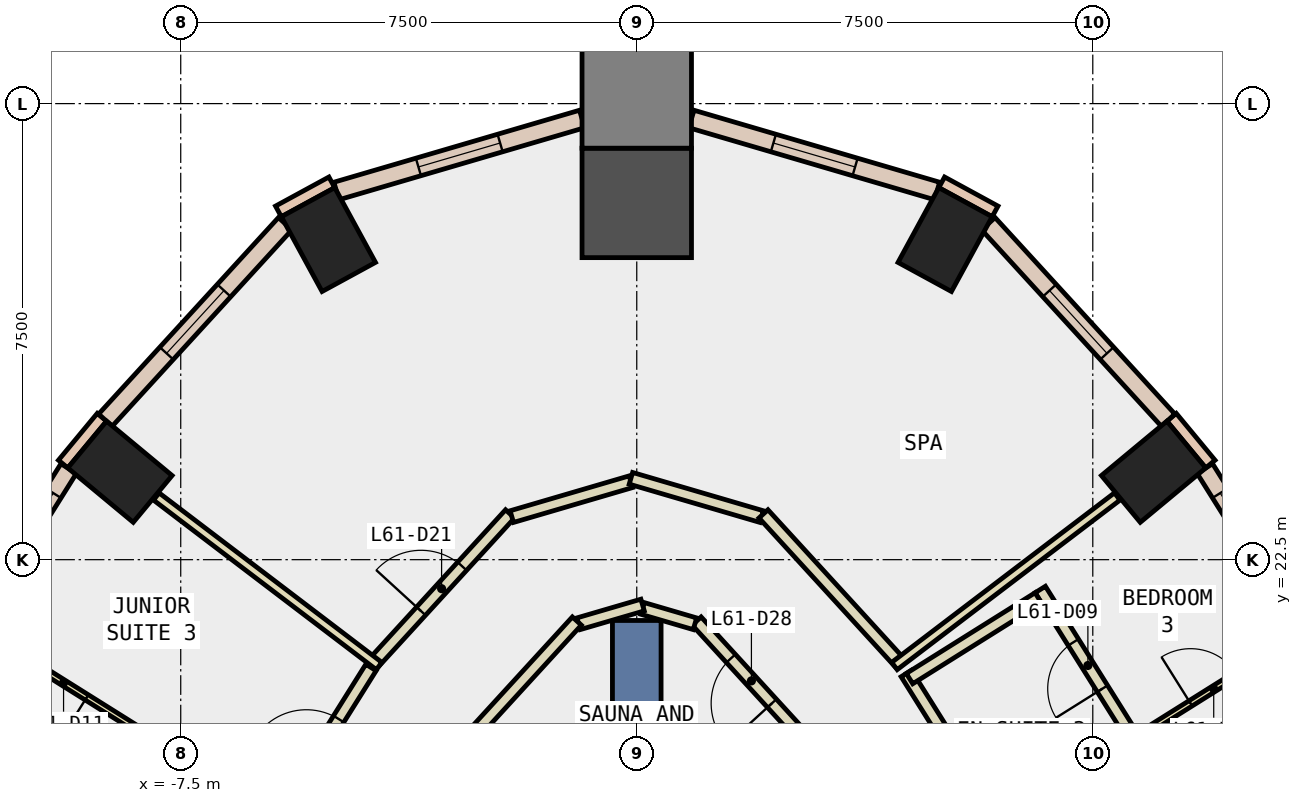
"""IFC4 building model, lengths in metres.
Left out: names, types, materials, properties, quantities, classifications, styles, units other than length and angle.
Written with IfcOpenShell. Run it as: python <this file> out.ifc"""

import sys

from ifc_helpers import new_model, si_unit, direction, frame, frame_2d, origin, origin_2d, place, context, subcontext, project, spatial, rectangle, extrude, element, fill, save


model = new_model("IFC4")
c1 = context("Model", 3, precision=1e-05, world=origin(), true_north=direction((0.0, 1.0)))
c2 = subcontext(c1, "Body", "Model", "MODEL_VIEW")
j1 = project(units=[si_unit("LENGTHUNIT", "METRE"), si_unit("PLANEANGLEUNIT", "RADIAN")], contexts=[c1])
p1 = place(None, origin())
s1 = spatial("IfcSite", under=j1, at=p1, CompositionType="ELEMENT")
p2 = place(p1, origin())
s2 = spatial("IfcBuilding", under=s1, at=p2, CompositionType="ELEMENT")
p3 = place(p2, frame((0.0, 0.0, 266.6)))
s3 = spatial("IfcBuildingStorey", under=s2, at=p3, CompositionType="ELEMENT", Elevation=266.6)
for number, where, z_axis, x_axis in (
    (1, (8.5, 23.946, -0.34), (0.0, 0.0, 1.0), (-0.639, 0.769, 0.0)),
    (2, (5.071, 27.764, -0.34), (0.0, 0.0, 1.0), (-0.878, 0.478, 0.0)),
):
    element("IfcColumn", number, at=place(p3, frame(where, z_axis=z_axis, x_axis=x_axis)), inside=s3, PredefinedType="COLUMN", context=c2, shape_type="SweptSolid", body=[
        extrude(rectangle(XDim=1.0, YDim=1.4, at=origin_2d()), origin(), (0.0, 0.0, 1.0), 3.6),
    ])
p4 = place(p3, frame((0.0, 28.367, -0.34), z_axis=(0.0, 0.0, 1.0), x_axis=(0.0, 1.0, 0.0)))
e3 = element("IfcColumn", 3, at=p4, inside=s3, PredefinedType="COLUMN", context=c2, shape_type="SweptSolid", body=[
    extrude(rectangle(XDim=1.8, YDim=1.8, at=origin_2d()), origin(), (0.0, 0.0, 1.0), 3.6),
])
for number, where, z_axis, x_axis in (
    (4, (-5.071, 27.764, -0.34), (0.0, 0.0, 1.0), (0.878, 0.478, 0.0)),
    (5, (-8.5, 23.946, -0.34), (0.0, 0.0, 1.0), (0.639, 0.769, 0.0)),
):
    element("IfcColumn", number, at=place(p3, frame(where, z_axis=z_axis, x_axis=x_axis)), inside=s3, PredefinedType="COLUMN", context=c2, shape_type="SweptSolid", body=[
        extrude(rectangle(XDim=1.0, YDim=1.4, at=origin_2d()), origin(), (0.0, 0.0, 1.0), 3.6),
    ])
p5 = place(p3, frame((0.0, 30.167, -0.34), z_axis=(0.0, 0.0, 1.0), x_axis=(0.0, 1.0, 0.0)))
e6 = element("IfcColumn", 6, at=p5, inside=s3, PredefinedType="COLUMN", context=c2, shape_type="SweptSolid", body=[
    extrude(rectangle(XDim=1.8, YDim=1.8, at=origin_2d()), origin(), (0.0, 0.0, 1.0), 3.6),
])
p6 = place(p3, frame((0.0, 12.5, -0.34), z_axis=(0.0, 0.0, 1.0), x_axis=(0.0, 1.0, 0.0)))
e7 = element("IfcWall", 7, at=p6, inside=s3, PredefinedType="SHEAR", context=c2, shape_type="SweptSolid", body=[
    extrude(rectangle(XDim=9.0, YDim=0.8, at=frame_2d((4.5, 0.0))), origin(), (0.0, 0.0, 1.0), 3.6),
])
for number, where, z_axis, x_axis in (
    (8, (5.893, 28.227, 0.0), (0.0, 0.0, 1.0), (-0.878, 0.478, 0.0)),
    (9, (-5.015, 28.705, 0.0), (0.0, 0.0, 1.0), (-0.878, -0.478, 0.0)),
):
    element("IfcWall", number, at=place(p3, frame(where, z_axis=z_axis, x_axis=x_axis)), inside=s3, PredefinedType="STANDARD", context=c2, shape_type="SweptSolid", body=[
        extrude(rectangle(XDim=1.0, YDim=0.2, at=frame_2d((0.5, 0.0))), origin(), (0.0, 0.0, 1.0), 3.26),
    ])
for number, where, z_axis, x_axis in (
    (10, (9.434, 24.072, 0.0), (0.0, 0.0, 1.0), (-0.638, 0.77, 0.0)),
    (11, (-8.796, 24.842, 0.0), (0.0, 0.0, 1.0), (-0.638, -0.77, 0.0)),
):
    element("IfcWall", number, at=place(p3, frame(where, z_axis=z_axis, x_axis=x_axis)), inside=s3, PredefinedType="STANDARD", context=c2, shape_type="SweptSolid", body=[
        extrude(rectangle(XDim=1.0, YDim=0.2, at=frame_2d((0.5, 0.0))), origin(), (0.0, 0.0, 1.0), 3.26),
    ])
p7 = place(p3, frame((12.372, 19.166, 0.0), z_axis=(0.0, 0.0, 1.0), x_axis=(-0.531137483242, 0.847285650708, 0.0)))
e12 = element("IfcWall", 12, at=p7, inside=s3, PredefinedType="STANDARD", context=c2, shape_type="SweptSolid", body=[
    extrude(rectangle(XDim=5.703, YDim=0.3, at=frame_2d((2.852, 0.0))), origin(), (0.0, 0.0, 1.0), 3.26),
])
p8 = place(p7, frame((0.476, 0.0, 0.9)))
e13 = element("IfcOpeningElement", 13, at=p8, cuts=e12, PredefinedType="OPENING", context=c2, shape_type="SweptSolid", body=[
    extrude(rectangle(XDim=1.9, YDim=2.0, at=frame_2d((0.95, 1.0))), frame((0.0, 0.16, 0.0), z_axis=(0.0, -1.0, 0.0), x_axis=(1.0, 0.0, 0.0)), (0.0, 0.0, 1.0), 0.32),
])
p9 = place(p7, frame((3.327, 0.0, 0.9)))
e14 = element("IfcOpeningElement", 14, at=p9, cuts=e12, PredefinedType="OPENING", context=c2, shape_type="SweptSolid", body=[
    extrude(rectangle(XDim=1.9, YDim=2.0, at=frame_2d((0.95, 1.0))), frame((0.0, 0.16, 0.0), z_axis=(0.0, -1.0, 0.0), x_axis=(1.0, 0.0, 0.0)), (0.0, 0.0, 1.0), 0.32),
])
p10 = place(p3, frame((8.739, 24.794, 0.0), z_axis=(0.0, 0.0, 1.0), x_axis=(-0.675143863554, 0.737686087374, 0.0)))
e15 = element("IfcWall", 15, at=p10, inside=s3, PredefinedType="STANDARD", context=c2, shape_type="SweptSolid", body=[
    extrude(rectangle(XDim=4.38, YDim=0.3, at=frame_2d((2.19, 0.0))), origin(), (0.0, 0.0, 1.0), 3.26),
])
p11 = place(p10, frame((1.49, 0.0, 0.9)))
e16 = element("IfcOpeningElement", 16, at=p11, cuts=e15, PredefinedType="OPENING", context=c2, shape_type="SweptSolid", body=[
    extrude(rectangle(XDim=1.4, YDim=2.0, at=frame_2d((0.7, 1.0))), frame((0.0, 0.16, 0.0), z_axis=(0.0, -1.0, 0.0), x_axis=(1.0, 0.0, 0.0)), (0.0, 0.0, 1.0), 0.32),
])
p12 = place(p3, frame((4.939, 28.563, 0.0), z_axis=(0.0, 0.0, 1.0), x_axis=(-0.959632861734, 0.281255703373, 0.0)))
e17 = element("IfcWall", 17, at=p12, inside=s3, PredefinedType="STANDARD", context=c2, shape_type="SweptSolid", body=[
    extrude(rectangle(XDim=4.21, YDim=0.3, at=frame_2d((2.105, 0.0))), origin(), (0.0, 0.0, 1.0), 3.26),
])
p13 = place(p12, frame((1.405, 0.0, 0.9)))
e18 = element("IfcOpeningElement", 18, at=p13, cuts=e17, PredefinedType="OPENING", context=c2, shape_type="SweptSolid", body=[
    extrude(rectangle(XDim=1.4, YDim=2.0, at=frame_2d((0.7, 1.0))), frame((0.0, 0.16, 0.0), z_axis=(0.0, -1.0, 0.0), x_axis=(1.0, 0.0, 0.0)), (0.0, 0.0, 1.0), 0.32),
])
p14 = place(p3, frame((-0.899, 29.747, 0.0), z_axis=(0.0, 0.0, 1.0), x_axis=(-0.959632861734, -0.281255703373, 0.0)))
e19 = element("IfcWall", 19, at=p14, inside=s3, PredefinedType="STANDARD", context=c2, shape_type="SweptSolid", body=[
    extrude(rectangle(XDim=4.21, YDim=0.3, at=frame_2d((2.105, 0.0))), origin(), (0.0, 0.0, 1.0), 3.26),
])
p15 = place(p14, frame((1.405, 0.0, 0.9)))
e20 = element("IfcOpeningElement", 20, at=p15, cuts=e19, PredefinedType="OPENING", context=c2, shape_type="SweptSolid", body=[
    extrude(rectangle(XDim=1.4, YDim=2.0, at=frame_2d((0.7, 1.0))), frame((0.0, 0.16, 0.0), z_axis=(0.0, -1.0, 0.0), x_axis=(1.0, 0.0, 0.0)), (0.0, 0.0, 1.0), 0.32),
])
p16 = place(p3, frame((-5.782, 28.025, 0.0), z_axis=(0.0, 0.0, 1.0), x_axis=(-0.675143863554, -0.737686087374, 0.0)))
e21 = element("IfcWall", 21, at=p16, inside=s3, PredefinedType="STANDARD", context=c2, shape_type="SweptSolid", body=[
    extrude(rectangle(XDim=4.38, YDim=0.3, at=frame_2d((2.19, 0.0))), origin(), (0.0, 0.0, 1.0), 3.26),
])
p17 = place(p16, frame((1.49, 0.0, 0.9)))
e22 = element("IfcOpeningElement", 22, at=p17, cuts=e21, PredefinedType="OPENING", context=c2, shape_type="SweptSolid", body=[
    extrude(rectangle(XDim=1.4, YDim=2.0, at=frame_2d((0.7, 1.0))), frame((0.0, 0.16, 0.0), z_axis=(0.0, -1.0, 0.0), x_axis=(1.0, 0.0, 0.0)), (0.0, 0.0, 1.0), 0.32),
])
p18 = place(p3, frame((-9.343, 23.998, 0.0), z_axis=(0.0, 0.0, 1.0), x_axis=(-0.531137483242, -0.847285650708, 0.0)))
e23 = element("IfcWall", 23, at=p18, inside=s3, PredefinedType="STANDARD", context=c2, shape_type="SweptSolid", body=[
    extrude(rectangle(XDim=5.703, YDim=0.3, at=frame_2d((2.852, 0.0))), origin(), (0.0, 0.0, 1.0), 3.26),
])
p19 = place(p18, frame((0.476, 0.0, 0.9)))
e24 = element("IfcOpeningElement", 24, at=p19, cuts=e23, PredefinedType="OPENING", context=c2, shape_type="SweptSolid", body=[
    extrude(rectangle(XDim=1.9, YDim=2.0, at=frame_2d((0.95, 1.0))), frame((0.0, 0.16, 0.0), z_axis=(0.0, -1.0, 0.0), x_axis=(1.0, 0.0, 0.0)), (0.0, 0.0, 1.0), 0.32),
])
p20 = place(p18, frame((3.327, 0.0, 0.9)))
e25 = element("IfcOpeningElement", 25, at=p20, cuts=e23, PredefinedType="OPENING", context=c2, shape_type="SweptSolid", body=[
    extrude(rectangle(XDim=1.9, YDim=2.0, at=frame_2d((0.95, 1.0))), frame((0.0, 0.16, 0.0), z_axis=(0.0, -1.0, 0.0), x_axis=(1.0, 0.0, 0.0)), (0.0, 0.0, 1.0), 0.32),
])
p21 = place(p3, frame((2.787, 19.522, 0.0), z_axis=(0.0, 0.0, 1.0), x_axis=(-0.675132105979, 0.73769684795, 0.0)))
e26 = element("IfcWall", 26, at=p21, inside=s3, PredefinedType="PARTITIONING", context=c2, shape_type="SweptSolid", body=[
    extrude(rectangle(XDim=2.669, YDim=0.2, at=frame_2d((1.334, 0.0))), origin(), (0.0, 0.0, 1.0), 3.26),
])
p22 = place(p21, frame((0.835, 0.0, 0.0)))
e27 = element("IfcOpeningElement", 27, at=p22, cuts=e26, PredefinedType="OPENING", context=c2, shape_type="SweptSolid", body=[
    extrude(rectangle(XDim=1.0, YDim=2.1, at=frame_2d((0.5, 1.05))), frame((0.0, 0.11, 0.0), z_axis=(0.0, -1.0, 0.0), x_axis=(1.0, 0.0, 0.0)), (0.0, 0.0, 1.0), 0.22),
])
p23 = place(p3, frame((0.957, 21.446, 0.0), z_axis=(0.0, 0.0, 1.0), x_axis=(-0.959758875404, 0.28082539252, 0.0)))
e28 = element("IfcWall", 28, at=p23, inside=s3, PredefinedType="PARTITIONING", context=c2, shape_type="SweptSolid", body=[
    extrude(rectangle(XDim=0.897, YDim=0.2, at=frame_2d((0.449, 0.0))), origin(), (0.0, 0.0, 1.0), 3.26),
])
p24 = place(p3, frame((0.096, 21.754, 0.0), z_axis=(0.0, 0.0, 1.0), x_axis=(-0.959817848073, -0.280623766849, 0.0)))
e29 = element("IfcWall", 29, at=p24, inside=s3, PredefinedType="PARTITIONING", context=c2, shape_type="SweptSolid", body=[
    extrude(rectangle(XDim=1.097, YDim=0.2, at=frame_2d((0.549, 0.0))), origin(), (0.0, 0.0, 1.0), 3.26),
])
p25 = place(p3, frame((-0.985, 21.491, 0.0), z_axis=(0.0, 0.0, 1.0), x_axis=(-0.675132105979, -0.73769684795, 0.0)))
e30 = element("IfcWall", 30, at=p25, inside=s3, PredefinedType="PARTITIONING", context=c2, shape_type="SweptSolid", body=[
    extrude(rectangle(XDim=2.669, YDim=0.2, at=frame_2d((1.334, 0.0))), origin(), (0.0, 0.0, 1.0), 3.26),
])
p26 = place(p3, frame((4.433, 20.628, 0.0), z_axis=(0.0, 0.0, 1.0), x_axis=(0.531135189756, -0.84728708842, 0.0)))
e31 = element("IfcWall", 31, at=p26, inside=s3, PredefinedType="PARTITIONING", context=c2, shape_type="SweptSolid", body=[
    extrude(rectangle(XDim=2.799, YDim=0.2, at=frame_2d((1.4, 0.0))), origin(), (0.0, 0.0, 1.0), 3.26),
])
p27 = place(p3, frame((-4.335, 20.793, 0.0), z_axis=(0.0, 0.0, 1.0), x_axis=(0.675074517272, 0.737749548377, 0.0)))
e32 = element("IfcWall", 32, at=p27, inside=s3, PredefinedType="PARTITIONING", context=c2, shape_type="SweptSolid", body=[
    extrude(rectangle(XDim=3.334, YDim=0.2, at=frame_2d((1.667, 0.0))), origin(), (0.0, 0.0, 1.0), 3.26),
])
p28 = place(p27, frame((1.167, 0.0, 0.0)))
e33 = element("IfcOpeningElement", 33, at=p28, cuts=e32, PredefinedType="OPENING", context=c2, shape_type="SweptSolid", body=[
    extrude(rectangle(XDim=1.0, YDim=2.1, at=frame_2d((0.5, 1.05))), frame((0.0, 0.11, 0.0), z_axis=(0.0, -1.0, 0.0), x_axis=(1.0, 0.0, 0.0)), (0.0, 0.0, 1.0), 0.22),
])
p29 = place(p3, frame((-2.055, 23.208, 0.0), z_axis=(0.0, 0.0, 1.0), x_axis=(0.959656367963, 0.281175488669, 0.0)))
e34 = element("IfcWall", 34, at=p29, inside=s3, PredefinedType="PARTITIONING", context=c2, shape_type="SweptSolid", body=[
    extrude(rectangle(XDim=2.041, YDim=0.2, at=frame_2d((1.021, 0.0))), origin(), (0.0, 0.0, 1.0), 3.26),
])
p30 = place(p3, frame((-0.096, 23.838, 0.0), z_axis=(0.0, 0.0, 1.0), x_axis=(0.959694419707, -0.281045584886, 0.0)))
e35 = element("IfcWall", 35, at=p30, inside=s3, PredefinedType="PARTITIONING", context=c2, shape_type="SweptSolid", body=[
    extrude(rectangle(XDim=2.241, YDim=0.2, at=frame_2d((1.121, 0.0))), origin(), (0.0, 0.0, 1.0), 3.26),
])
p31 = place(p3, frame((2.084, 23.253, 0.0), z_axis=(0.0, 0.0, 1.0), x_axis=(0.675074517272, -0.737749548377, 0.0)))
e36 = element("IfcWall", 36, at=p31, inside=s3, PredefinedType="PARTITIONING", context=c2, shape_type="SweptSolid", body=[
    extrude(rectangle(XDim=3.334, YDim=0.2, at=frame_2d((1.667, 0.0))), origin(), (0.0, 0.0, 1.0), 3.26),
])
p32 = place(p3, frame((-5.965, 18.185, 0.0), z_axis=(0.0, 0.0, 1.0), x_axis=(0.531256372055, 0.847211111324, 0.0)))
e37 = element("IfcWall", 37, at=p32, inside=s3, PredefinedType="PARTITIONING", context=c2, shape_type="SweptSolid", body=[
    extrude(rectangle(XDim=3.0, YDim=0.2, at=frame_2d((1.5, 0.0))), origin(), (0.0, 0.0, 1.0), 3.26),
])
p33 = place(p32, frame((1.0, 0.0, 0.0)))
e38 = element("IfcOpeningElement", 38, at=p33, cuts=e37, PredefinedType="OPENING", context=c2, shape_type="SweptSolid", body=[
    extrude(rectangle(XDim=1.0, YDim=2.1, at=frame_2d((0.5, 1.05))), frame((0.0, 0.11, 0.0), z_axis=(0.0, -1.0, 0.0), x_axis=(1.0, 0.0, 0.0)), (0.0, 0.0, 1.0), 0.22),
])
p34 = place(p3, frame((8.091, 19.499, 0.0), z_axis=(0.0, 0.0, 1.0), x_axis=(0.847249319986, 0.53119543464, 0.0)))
e39 = element("IfcWall", 39, at=p34, inside=s3, PredefinedType="PARTITIONING", context=c2, shape_type="SweptSolid", body=[
    extrude(rectangle(XDim=3.3, YDim=0.1, at=frame_2d((1.65, 0.0))), origin(), (0.0, 0.0, 1.0), 3.26),
])
p35 = place(p34, frame((1.2, 0.0, 0.0)))
e40 = element("IfcOpeningElement", 40, at=p35, cuts=e39, PredefinedType="OPENING", context=c2, shape_type="SweptSolid", body=[
    extrude(rectangle(XDim=0.9, YDim=2.1, at=frame_2d((0.45, 1.05))), frame((0.0, 0.06, 0.0), z_axis=(0.0, -1.0, 0.0), x_axis=(1.0, 0.0, 0.0)), (0.0, 0.0, 1.0), 0.12),
])
p36 = place(p3, frame((8.203, 19.51, 0.0), z_axis=(0.0, 0.0, 1.0), x_axis=(-0.531218552952, 0.847234825181, 0.0)))
e41 = element("IfcWall", 41, at=p36, inside=s3, PredefinedType="PARTITIONING", context=c2, shape_type="SweptSolid", body=[
    extrude(rectangle(XDim=2.95, YDim=0.2, at=frame_2d((1.475, 0.0))), origin(), (0.0, 0.0, 1.0), 3.26),
])
p37 = place(p36, frame((1.025, 0.0, 0.0)))
e42 = element("IfcOpeningElement", 42, at=p37, cuts=e41, PredefinedType="OPENING", context=c2, shape_type="SweptSolid", body=[
    extrude(rectangle(XDim=0.9, YDim=2.1, at=frame_2d((0.45, 1.05))), frame((0.0, 0.11, 0.0), z_axis=(0.0, -1.0, 0.0), x_axis=(1.0, 0.0, 0.0)), (0.0, 0.0, 1.0), 0.22),
])
p38 = place(p3, frame((6.604, 21.871, 0.0), z_axis=(0.0, 0.0, 1.0), x_axis=(-0.847377617561, -0.530990746866, 0.0)))
e43 = element("IfcWall", 43, at=p38, inside=s3, PredefinedType="PARTITIONING", context=c2, shape_type="SweptSolid", body=[
    extrude(rectangle(XDim=2.499, YDim=0.2, at=frame_2d((1.25, 0.0))), origin(), (0.0, 0.0, 1.0), 3.26),
])
for number, where, z_axis, x_axis in (
    (44, (4.238, 20.751, 0.0), (0.0, 0.0, 1.0), (0.796, 0.606, 0.0)),
    (45, (-4.238, 20.751, 0.0), (0.0, 0.0, 1.0), (-0.796, 0.606, 0.0)),
):
    element("IfcWall", number, at=place(p3, frame(where, z_axis=z_axis, x_axis=x_axis)), inside=s3, PredefinedType="PARTITIONING", context=c2, shape_type="SweptSolid", body=[
        extrude(rectangle(XDim=4.604, YDim=0.15, at=frame_2d((2.302, 0.0))), origin(), (0.0, 0.0, 1.0), 3.26),
    ])
p39 = place(p3, frame((-8.029, 19.598, 0.0), z_axis=(0.0, 0.0, 1.0), x_axis=(-0.847216023371, 0.531248538581, 0.0)))
e46 = element("IfcWall", 46, at=p39, inside=s3, PredefinedType="PARTITIONING", context=c2, shape_type="SweptSolid", body=[
    extrude(rectangle(XDim=3.3, YDim=0.1, at=frame_2d((1.65, 0.0))), origin(), (0.0, 0.0, 1.0), 3.26),
])
p40 = place(p39, frame((1.2, 0.0, 0.0)))
e47 = element("IfcOpeningElement", 47, at=p40, cuts=e46, PredefinedType="OPENING", context=c2, shape_type="SweptSolid", body=[
    extrude(rectangle(XDim=0.9, YDim=2.1, at=frame_2d((0.45, 1.05))), frame((0.0, 0.06, 0.0), z_axis=(0.0, -1.0, 0.0), x_axis=(1.0, 0.0, 0.0)), (0.0, 0.0, 1.0), 0.12),
])
p41 = place(p9, origin())
e48 = element("IfcWindow", 48, at=p41, inside=s3, PartitioningType="SINGLE_PANEL", PredefinedType="WINDOW", context=c2, shape_type="SweptSolid", body=[
    extrude(rectangle(XDim=1.9, YDim=2.0, at=frame_2d((0.95, 1.0))), frame((0.0, 0.03, 0.0), z_axis=(0.0, -1.0, 0.0), x_axis=(1.0, 0.0, 0.0)), (0.0, 0.0, 1.0), 0.06),
])
fill(e14, e48)
p42 = place(p11, origin())
e49 = element("IfcWindow", 49, at=p42, inside=s3, PartitioningType="SINGLE_PANEL", PredefinedType="WINDOW", context=c2, shape_type="SweptSolid", body=[
    extrude(rectangle(XDim=1.4, YDim=2.0, at=frame_2d((0.7, 1.0))), frame((0.0, 0.03, 0.0), z_axis=(0.0, -1.0, 0.0), x_axis=(1.0, 0.0, 0.0)), (0.0, 0.0, 1.0), 0.06),
])
fill(e16, e49)
p43 = place(p13, origin())
e50 = element("IfcWindow", 50, at=p43, inside=s3, PartitioningType="SINGLE_PANEL", PredefinedType="WINDOW", context=c2, shape_type="SweptSolid", body=[
    extrude(rectangle(XDim=1.4, YDim=2.0, at=frame_2d((0.7, 1.0))), frame((0.0, 0.03, 0.0), z_axis=(0.0, -1.0, 0.0), x_axis=(1.0, 0.0, 0.0)), (0.0, 0.0, 1.0), 0.06),
])
fill(e18, e50)
p44 = place(p15, origin())
e51 = element("IfcWindow", 51, at=p44, inside=s3, PartitioningType="SINGLE_PANEL", PredefinedType="WINDOW", context=c2, shape_type="SweptSolid", body=[
    extrude(rectangle(XDim=1.4, YDim=2.0, at=frame_2d((0.7, 1.0))), frame((0.0, 0.03, 0.0), z_axis=(0.0, -1.0, 0.0), x_axis=(1.0, 0.0, 0.0)), (0.0, 0.0, 1.0), 0.06),
])
fill(e20, e51)
p45 = place(p17, origin())
e52 = element("IfcWindow", 52, at=p45, inside=s3, PartitioningType="SINGLE_PANEL", PredefinedType="WINDOW", context=c2, shape_type="SweptSolid", body=[
    extrude(rectangle(XDim=1.4, YDim=2.0, at=frame_2d((0.7, 1.0))), frame((0.0, 0.03, 0.0), z_axis=(0.0, -1.0, 0.0), x_axis=(1.0, 0.0, 0.0)), (0.0, 0.0, 1.0), 0.06),
])
fill(e22, e52)
p46 = place(p19, origin())
e53 = element("IfcWindow", 53, at=p46, inside=s3, PartitioningType="SINGLE_PANEL", PredefinedType="WINDOW", context=c2, shape_type="SweptSolid", body=[
    extrude(rectangle(XDim=1.9, YDim=2.0, at=frame_2d((0.95, 1.0))), frame((0.0, 0.03, 0.0), z_axis=(0.0, -1.0, 0.0), x_axis=(1.0, 0.0, 0.0)), (0.0, 0.0, 1.0), 0.06),
])
fill(e24, e53)
p47 = place(p35, origin())
e54 = element("IfcDoor", 54, at=p47, inside=s3, OperationType="SINGLE_SWING_LEFT", PredefinedType="DOOR", context=c2, shape_type="SweptSolid", body=[
    extrude(rectangle(XDim=0.9, YDim=2.1, at=frame_2d((0.45, 1.05))), frame((0.0, 0.025, 0.0), z_axis=(0.0, -1.0, 0.0), x_axis=(1.0, 0.0, 0.0)), (0.0, 0.0, 1.0), 0.05),
])
fill(e40, e54)
p48 = place(p37, origin())
e55 = element("IfcDoor", 55, at=p48, inside=s3, OperationType="SINGLE_SWING_RIGHT", PredefinedType="DOOR", context=c2, shape_type="SweptSolid", body=[
    extrude(rectangle(XDim=0.9, YDim=2.1, at=frame_2d((0.45, 1.05))), frame((0.0, 0.025, 0.0), z_axis=(0.0, -1.0, 0.0), x_axis=(1.0, 0.0, 0.0)), (0.0, 0.0, 1.0), 0.05),
])
fill(e42, e55)
p49 = place(p33, origin())
e56 = element("IfcDoor", 56, at=p49, inside=s3, OperationType="SINGLE_SWING_LEFT", PredefinedType="DOOR", context=c2, shape_type="SweptSolid", body=[
    extrude(rectangle(XDim=1.0, YDim=2.1, at=frame_2d((0.5, 1.05))), frame((0.0, 0.025, 0.0), z_axis=(0.0, -1.0, 0.0), x_axis=(1.0, 0.0, 0.0)), (0.0, 0.0, 1.0), 0.05),
])
fill(e38, e56)
p50 = place(p40, origin())
e57 = element("IfcDoor", 57, at=p50, inside=s3, OperationType="SINGLE_SWING_RIGHT", PredefinedType="DOOR", context=c2, shape_type="SweptSolid", body=[
    extrude(rectangle(XDim=0.9, YDim=2.1, at=frame_2d((0.45, 1.05))), frame((0.0, 0.025, 0.0), z_axis=(0.0, -1.0, 0.0), x_axis=(1.0, 0.0, 0.0)), (0.0, 0.0, 1.0), 0.05),
])
fill(e47, e57)
p51 = place(p28, origin())
e58 = element("IfcDoor", 58, at=p51, inside=s3, OperationType="SINGLE_SWING_LEFT", PredefinedType="DOOR", context=c2, shape_type="SweptSolid", body=[
    extrude(rectangle(XDim=1.0, YDim=2.1, at=frame_2d((0.5, 1.05))), frame((0.0, 0.025, 0.0), z_axis=(0.0, -1.0, 0.0), x_axis=(1.0, 0.0, 0.0)), (0.0, 0.0, 1.0), 0.05),
])
fill(e33, e58)
p52 = place(p22, origin())
e59 = element("IfcDoor", 59, at=p52, inside=s3, OperationType="SINGLE_SWING_LEFT", PredefinedType="DOOR", context=c2, shape_type="SweptSolid", body=[
    extrude(rectangle(XDim=1.0, YDim=2.1, at=frame_2d((0.5, 1.05))), frame((0.0, 0.025, 0.0), z_axis=(0.0, -1.0, 0.0), x_axis=(1.0, 0.0, 0.0)), (0.0, 0.0, 1.0), 0.05),
])
fill(e27, e59)
save(model, sys.argv[1])
